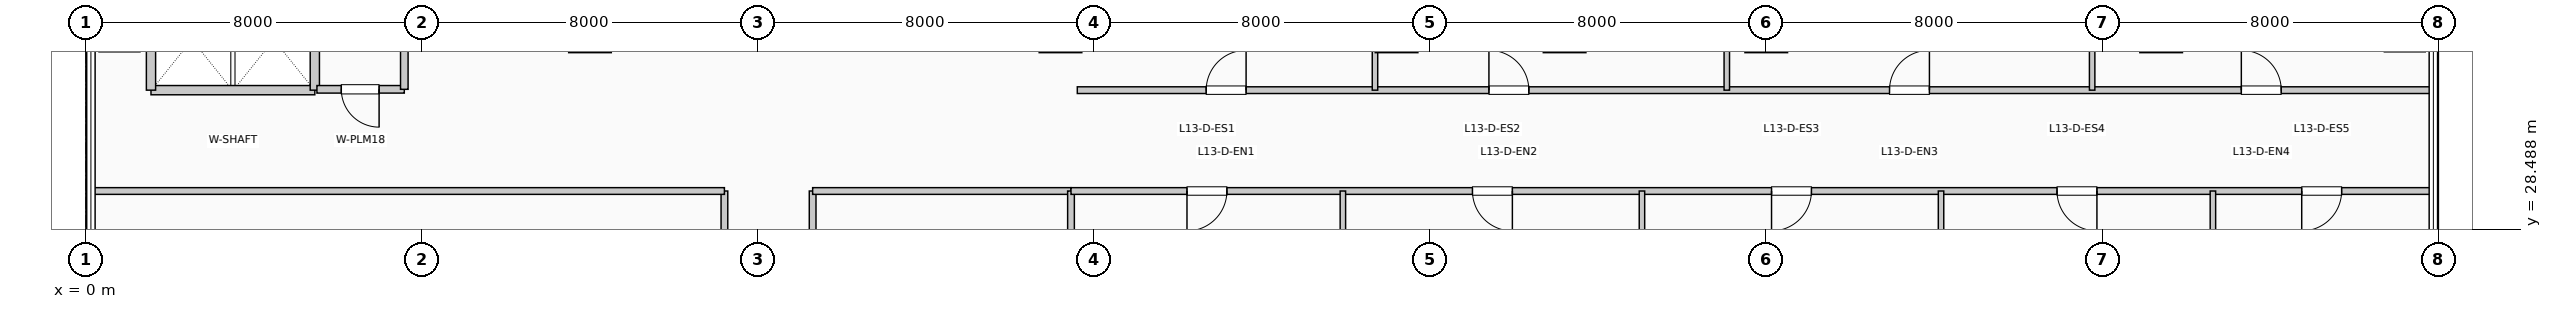
"""IFC4 building model, lengths in metres.
Left out: names, types, materials, properties, quantities, classifications, styles, units other than length and angle.
Written with IfcOpenShell. Run it as: python <this file> out.ifc"""

import sys

from ifc_helpers import new_model, si_unit, direction, frame, frame_2d, origin, place, context, subcontext, project, spatial, rectangle, extrude, element, fill, save


model = new_model("IFC4")
c1 = context("Model", 3, precision=1e-05, world=origin(), true_north=direction((0.0, 1.0)))
c2 = subcontext(c1, "Body", "Model", "MODEL_VIEW")
j1 = project(units=[si_unit("LENGTHUNIT", "METRE"), si_unit("PLANEANGLEUNIT", "RADIAN")], contexts=[c1])
p1 = place(None, origin())
s1 = spatial("IfcSite", under=j1, at=p1, CompositionType="ELEMENT")
p2 = place(p1, origin())
s2 = spatial("IfcBuilding", under=s1, at=p2, CompositionType="ELEMENT")
p3 = place(p2, frame((0.0, 0.0, 58.08)))
s3 = spatial("IfcBuildingStorey", under=s2, at=p3, CompositionType="ELEMENT", Elevation=58.08)
p4 = place(p3, frame((1.55, 31.8, 0.0), z_axis=(0.0, 0.0, 1.0), x_axis=(1.0, 0.0, 0.0)))
e1 = element("IfcWall", 1, at=p4, inside=s3, PredefinedType="PARTITIONING", context=c2, shape_type="SweptSolid", body=[
    extrude(rectangle(XDim=3.9, YDim=0.22, at=frame_2d((1.95, 0.0))), origin(), (0.0, 0.0, 1.0), 3.71),
])
for number, where, z_axis, x_axis in (
    (2, (1.55, 31.8, 0.0), (0.0, 0.0, 1.0), (0.0, 1.0, 0.0)),
    (3, (5.45, 31.8, 0.0), (0.0, 0.0, 1.0), (0.0, 1.0, 0.0)),
):
    element("IfcWall", number, at=place(p3, frame(where, z_axis=z_axis, x_axis=x_axis)), inside=s3, PredefinedType="PARTITIONING", context=c2, shape_type="SweptSolid", body=[
        extrude(rectangle(XDim=2.38, YDim=0.22, at=frame_2d((1.19, 0.0))), origin(), (0.0, 0.0, 1.0), 3.71),
    ])
p5 = place(p3, frame((5.5, 31.82, 0.0), z_axis=(0.0, 0.0, 1.0), x_axis=(1.0, 0.0, 0.0)))
e4 = element("IfcWall", 4, at=p5, inside=s3, PredefinedType="PLUMBINGWALL", context=c2, shape_type="SweptSolid", body=[
    extrude(rectangle(XDim=2.08, YDim=0.18, at=frame_2d((1.04, 0.0))), origin(), (0.0, 0.0, 1.0), 3.71),
])
p6 = place(p5, frame((1.48, 0.0, 0.0), z_axis=(0.0, 0.0, 1.0), x_axis=(-1.0, 0.0, 0.0)))
e5 = element("IfcOpeningElement", 5, at=p6, cuts=e4, PredefinedType="OPENING", context=c2, shape_type="SweptSolid", body=[
    extrude(rectangle(XDim=0.9, YDim=2.1, at=frame_2d((0.45, 1.05))), frame((0.0, 0.1, 0.0), z_axis=(0.0, -1.0, 0.0), x_axis=(1.0, 0.0, 0.0)), (0.0, 0.0, 1.0), 0.2),
])
p7 = place(p3, frame((7.58, 31.82, 0.0), z_axis=(0.0, 0.0, 1.0), x_axis=(0.0, 1.0, 0.0)))
e6 = element("IfcWall", 6, at=p7, inside=s3, PredefinedType="PLUMBINGWALL", context=c2, shape_type="SweptSolid", body=[
    extrude(rectangle(XDim=2.36, YDim=0.18, at=frame_2d((1.18, 0.0))), origin(), (0.0, 0.0, 1.0), 3.71),
])
p8 = place(p3, frame((15.2, 4.39, 0.0), z_axis=(0.0, 0.0, 1.0), x_axis=(0.0, 1.0, 0.0)))
e7 = element("IfcWall", 7, at=p8, inside=s3, PredefinedType="PARTITIONING", context=c2, shape_type="SweptSolid", body=[
    extrude(rectangle(XDim=25.01, YDim=0.16, at=frame_2d((12.505, 0.0))), origin(), (0.0, 0.0, 1.0), 3.71),
])
p9 = place(p8, frame((2.851, 0.0, 0.0), z_axis=(0.0, 0.0, 1.0), x_axis=(-1.0, 0.0, 0.0)))
e8 = element("IfcOpeningElement", 8, at=p9, cuts=e7, PredefinedType="OPENING", context=c2, shape_type="SweptSolid", body=[
    extrude(rectangle(XDim=0.95, YDim=2.15, at=frame_2d((0.475, 1.075))), frame((0.0, 0.09, 0.0), z_axis=(0.0, -1.0, 0.0), x_axis=(1.0, 0.0, 0.0)), (0.0, 0.0, 1.0), 0.18),
])
p10 = place(p8, frame((7.728, 0.0, 0.0), z_axis=(0.0, 0.0, 1.0), x_axis=(-1.0, 0.0, 0.0)))
e9 = element("IfcOpeningElement", 9, at=p10, cuts=e7, PredefinedType="OPENING", context=c2, shape_type="SweptSolid", body=[
    extrude(rectangle(XDim=0.95, YDim=2.15, at=frame_2d((0.475, 1.075))), frame((0.0, 0.09, 0.0), z_axis=(0.0, -1.0, 0.0), x_axis=(1.0, 0.0, 0.0)), (0.0, 0.0, 1.0), 0.18),
])
p11 = place(p8, frame((12.73, 0.0, 0.0), z_axis=(0.0, 0.0, 1.0), x_axis=(-1.0, 0.0, 0.0)))
e10 = element("IfcOpeningElement", 10, at=p11, cuts=e7, PredefinedType="OPENING", context=c2, shape_type="SweptSolid", body=[
    extrude(rectangle(XDim=0.95, YDim=2.15, at=frame_2d((0.475, 1.075))), frame((0.0, 0.09, 0.0), z_axis=(0.0, -1.0, 0.0), x_axis=(1.0, 0.0, 0.0)), (0.0, 0.0, 1.0), 0.18),
])
p12 = place(p8, frame((17.732, 0.0, 0.0), z_axis=(0.0, 0.0, 1.0), x_axis=(-1.0, 0.0, 0.0)))
e11 = element("IfcOpeningElement", 11, at=p12, cuts=e7, PredefinedType="OPENING", context=c2, shape_type="SweptSolid", body=[
    extrude(rectangle(XDim=0.95, YDim=2.15, at=frame_2d((0.475, 1.075))), frame((0.0, 0.09, 0.0), z_axis=(0.0, -1.0, 0.0), x_axis=(1.0, 0.0, 0.0)), (0.0, 0.0, 1.0), 0.18),
])
p13 = place(p8, frame((22.859, 0.0, 0.0), z_axis=(0.0, 0.0, 1.0), x_axis=(-1.0, 0.0, 0.0)))
e12 = element("IfcOpeningElement", 12, at=p13, cuts=e7, PredefinedType="OPENING", context=c2, shape_type="SweptSolid", body=[
    extrude(rectangle(XDim=0.95, YDim=2.15, at=frame_2d((0.475, 1.075))), frame((0.0, 0.09, 0.0), z_axis=(0.0, -1.0, 0.0), x_axis=(1.0, 0.0, 0.0)), (0.0, 0.0, 1.0), 0.18),
])
p14 = place(p3, frame((17.3, 4.39, 0.0), z_axis=(0.0, 0.0, 1.0), x_axis=(0.0, 1.0, 0.0)))
e13 = element("IfcWall", 13, at=p14, inside=s3, PredefinedType="PARTITIONING", context=c2, shape_type="SweptSolid", body=[
    extrude(rectangle(XDim=25.01, YDim=0.16, at=frame_2d((12.505, 0.0))), origin(), (0.0, 0.0, 1.0), 3.71),
])
p15 = place(p14, frame((5.778, 0.0, 0.0)))
e14 = element("IfcOpeningElement", 14, at=p15, cuts=e13, PredefinedType="OPENING", context=c2, shape_type="SweptSolid", body=[
    extrude(rectangle(XDim=0.95, YDim=2.15, at=frame_2d((0.475, 1.075))), frame((0.0, 0.09, 0.0), z_axis=(0.0, -1.0, 0.0), x_axis=(1.0, 0.0, 0.0)), (0.0, 0.0, 1.0), 0.18),
])
p16 = place(p14, frame((18.282, 0.0, 0.0)))
e15 = element("IfcOpeningElement", 15, at=p16, cuts=e13, PredefinedType="OPENING", context=c2, shape_type="SweptSolid", body=[
    extrude(rectangle(XDim=0.95, YDim=2.15, at=frame_2d((0.475, 1.075))), frame((0.0, 0.09, 0.0), z_axis=(0.0, -1.0, 0.0), x_axis=(1.0, 0.0, 0.0)), (0.0, 0.0, 1.0), 0.18),
])
p17 = place(p3, frame((0.19, 29.4, 0.0), z_axis=(0.0, 0.0, 1.0), x_axis=(1.0, 0.0, 0.0)))
e16 = element("IfcWall", 16, at=p17, inside=s3, PredefinedType="PARTITIONING", context=c2, shape_type="SweptSolid", body=[
    extrude(rectangle(XDim=15.01, YDim=0.16, at=frame_2d((7.505, 0.0))), origin(), (0.0, 0.0, 1.0), 3.365),
])
p18 = place(p3, frame((17.3, 29.4, 0.0), z_axis=(0.0, 0.0, 1.0), x_axis=(1.0, 0.0, 0.0)))
e17 = element("IfcWall", 17, at=p18, inside=s3, PredefinedType="PARTITIONING", context=c2, shape_type="SweptSolid", body=[
    extrude(rectangle(XDim=6.15, YDim=0.16, at=frame_2d((3.075, 0.0))), origin(), (0.0, 0.0, 1.0), 3.71),
])
p19 = place(p3, frame((23.45, 0.19, 0.0), z_axis=(0.0, 0.0, 1.0), x_axis=(0.0, 1.0, 0.0)))
e18 = element("IfcWall", 18, at=p19, inside=s3, PredefinedType="PARTITIONING", context=c2, shape_type="SweptSolid", body=[
    extrude(rectangle(XDim=29.21, YDim=0.16, at=frame_2d((14.605, 0.0))), origin(), (0.0, 0.0, 1.0), 2.995),
])
p20 = place(p3, frame((23.45, 29.4, 0.0), z_axis=(0.0, 0.0, 1.0), x_axis=(1.0, 0.0, 0.0)))
e19 = element("IfcWall", 19, at=p20, inside=s3, PredefinedType="PARTITIONING", context=c2, shape_type="SweptSolid", body=[
    extrude(rectangle(XDim=32.36, YDim=0.16, at=frame_2d((16.18, 0.0))), origin(), (0.0, 0.0, 1.0), 3.365),
])
p21 = place(p20, frame((3.711, 0.0, 0.0), z_axis=(0.0, 0.0, 1.0), x_axis=(-1.0, 0.0, 0.0)))
e20 = element("IfcOpeningElement", 20, at=p21, cuts=e19, PredefinedType="OPENING", context=c2, shape_type="SweptSolid", body=[
    extrude(rectangle(XDim=0.95, YDim=2.15, at=frame_2d((0.475, 1.075))), frame((0.0, 0.09, 0.0), z_axis=(0.0, -1.0, 0.0), x_axis=(1.0, 0.0, 0.0)), (0.0, 0.0, 1.0), 0.18),
])
p22 = place(p20, frame((10.507, 0.0, 0.0), z_axis=(0.0, 0.0, 1.0), x_axis=(-1.0, 0.0, 0.0)))
e21 = element("IfcOpeningElement", 21, at=p22, cuts=e19, PredefinedType="OPENING", context=c2, shape_type="SweptSolid", body=[
    extrude(rectangle(XDim=0.95, YDim=2.15, at=frame_2d((0.475, 1.075))), frame((0.0, 0.09, 0.0), z_axis=(0.0, -1.0, 0.0), x_axis=(1.0, 0.0, 0.0)), (0.0, 0.0, 1.0), 0.18),
])
p23 = place(p20, frame((17.626, 0.0, 0.0), z_axis=(0.0, 0.0, 1.0), x_axis=(-1.0, 0.0, 0.0)))
e22 = element("IfcOpeningElement", 22, at=p23, cuts=e19, PredefinedType="OPENING", context=c2, shape_type="SweptSolid", body=[
    extrude(rectangle(XDim=0.95, YDim=2.15, at=frame_2d((0.475, 1.075))), frame((0.0, 0.09, 0.0), z_axis=(0.0, -1.0, 0.0), x_axis=(1.0, 0.0, 0.0)), (0.0, 0.0, 1.0), 0.18),
])
p24 = place(p20, frame((24.421, 0.0, 0.0), z_axis=(0.0, 0.0, 1.0), x_axis=(-1.0, 0.0, 0.0)))
e23 = element("IfcOpeningElement", 23, at=p24, cuts=e19, PredefinedType="OPENING", context=c2, shape_type="SweptSolid", body=[
    extrude(rectangle(XDim=0.95, YDim=2.15, at=frame_2d((0.475, 1.075))), frame((0.0, 0.09, 0.0), z_axis=(0.0, -1.0, 0.0), x_axis=(1.0, 0.0, 0.0)), (0.0, 0.0, 1.0), 0.18),
])
p25 = place(p20, frame((30.246, 0.0, 0.0), z_axis=(0.0, 0.0, 1.0), x_axis=(-1.0, 0.0, 0.0)))
e24 = element("IfcOpeningElement", 24, at=p25, cuts=e19, PredefinedType="OPENING", context=c2, shape_type="SweptSolid", body=[
    extrude(rectangle(XDim=0.95, YDim=2.15, at=frame_2d((0.475, 1.075))), frame((0.0, 0.09, 0.0), z_axis=(0.0, -1.0, 0.0), x_axis=(1.0, 0.0, 0.0)), (0.0, 0.0, 1.0), 0.18),
])
p26 = place(p3, frame((23.6, 31.8, 0.0), z_axis=(0.0, 0.0, 1.0), x_axis=(1.0, 0.0, 0.0)))
e25 = element("IfcWall", 25, at=p26, inside=s3, PredefinedType="PARTITIONING", context=c2, shape_type="SweptSolid", body=[
    extrude(rectangle(XDim=32.21, YDim=0.16, at=frame_2d((16.105, 0.0))), origin(), (0.0, 0.0, 1.0), 3.71),
])
p27 = place(p26, frame((3.068, 0.0, 0.0)))
e26 = element("IfcOpeningElement", 26, at=p27, cuts=e25, PredefinedType="OPENING", context=c2, shape_type="SweptSolid", body=[
    extrude(rectangle(XDim=0.95, YDim=2.15, at=frame_2d((0.475, 1.075))), frame((0.0, 0.09, 0.0), z_axis=(0.0, -1.0, 0.0), x_axis=(1.0, 0.0, 0.0)), (0.0, 0.0, 1.0), 0.18),
])
p28 = place(p26, frame((9.799, 0.0, 0.0)))
e27 = element("IfcOpeningElement", 27, at=p28, cuts=e25, PredefinedType="OPENING", context=c2, shape_type="SweptSolid", body=[
    extrude(rectangle(XDim=0.95, YDim=2.15, at=frame_2d((0.475, 1.075))), frame((0.0, 0.09, 0.0), z_axis=(0.0, -1.0, 0.0), x_axis=(1.0, 0.0, 0.0)), (0.0, 0.0, 1.0), 0.18),
])
p29 = place(p26, frame((19.334, 0.0, 0.0)))
e28 = element("IfcOpeningElement", 28, at=p29, cuts=e25, PredefinedType="OPENING", context=c2, shape_type="SweptSolid", body=[
    extrude(rectangle(XDim=0.95, YDim=2.15, at=frame_2d((0.475, 1.075))), frame((0.0, 0.09, 0.0), z_axis=(0.0, -1.0, 0.0), x_axis=(1.0, 0.0, 0.0)), (0.0, 0.0, 1.0), 0.18),
])
p30 = place(p26, frame((27.709, 0.0, 0.0)))
e29 = element("IfcOpeningElement", 29, at=p30, cuts=e25, PredefinedType="OPENING", context=c2, shape_type="SweptSolid", body=[
    extrude(rectangle(XDim=0.95, YDim=2.15, at=frame_2d((0.475, 1.075))), frame((0.0, 0.09, 0.0), z_axis=(0.0, -1.0, 0.0), x_axis=(1.0, 0.0, 0.0)), (0.0, 0.0, 1.0), 0.18),
])
for number, where, z_axis, x_axis in (
    (30, (29.922, 18.19, 0.0), (0.0, 0.0, 1.0), (0.0, 1.0, 0.0)),
    (31, (37.041, 18.19, 0.0), (0.0, 0.0, 1.0), (0.0, 1.0, 0.0)),
    (32, (44.16, 18.19, 0.0), (0.0, 0.0, 1.0), (0.0, 1.0, 0.0)),
    (33, (50.632, 18.19, 0.0), (0.0, 0.0, 1.0), (0.0, 1.0, 0.0)),
):
    element("IfcWall", number, at=place(p3, frame(where, z_axis=z_axis, x_axis=x_axis)), inside=s3, PredefinedType="PARTITIONING", context=c2, shape_type="SweptSolid", body=[
        extrude(rectangle(XDim=11.21, YDim=0.13, at=frame_2d((5.605, 0.0))), origin(), (0.0, 0.0, 1.0), 3.71),
    ])
for number, where, z_axis, x_axis in (
    (34, (30.686, 31.8, 0.0), (0.0, 0.0, 1.0), (0.0, 1.0, 0.0)),
    (35, (39.061, 31.8, 0.0), (0.0, 0.0, 1.0), (0.0, 1.0, 0.0)),
    (36, (47.758, 31.8, 0.0), (0.0, 0.0, 1.0), (0.0, 1.0, 0.0)),
):
    element("IfcWall", number, at=place(p3, frame(where, z_axis=z_axis, x_axis=x_axis)), inside=s3, PredefinedType="PARTITIONING", context=c2, shape_type="SweptSolid", body=[
        extrude(rectangle(XDim=14.01, YDim=0.13, at=frame_2d((7.005, 0.0))), origin(), (0.0, 0.0, 1.0), 3.71),
    ])
p31 = place(p6, origin())
e37 = element("IfcDoor", 37, at=p31, inside=s3, OperationType="SINGLE_SWING_RIGHT", PredefinedType="DOOR", context=c2, shape_type="SweptSolid", body=[
    extrude(rectangle(XDim=0.9, YDim=2.1, at=frame_2d((0.45, 1.05))), frame((0.0, 0.025, 0.0), z_axis=(0.0, -1.0, 0.0), x_axis=(1.0, 0.0, 0.0)), (0.0, 0.0, 1.0), 0.05),
])
fill(e5, e37)
p32 = place(p21, origin())
e38 = element("IfcDoor", 38, at=p32, inside=s3, OperationType="SINGLE_SWING_LEFT", PredefinedType="DOOR", context=c2, shape_type="SweptSolid", body=[
    extrude(rectangle(XDim=0.95, YDim=2.15, at=frame_2d((0.475, 1.075))), frame((0.0, 0.025, 0.0), z_axis=(0.0, -1.0, 0.0), x_axis=(1.0, 0.0, 0.0)), (0.0, 0.0, 1.0), 0.05),
])
fill(e20, e38)
p33 = place(p22, origin())
e39 = element("IfcDoor", 39, at=p33, inside=s3, OperationType="SINGLE_SWING_RIGHT", PredefinedType="DOOR", context=c2, shape_type="SweptSolid", body=[
    extrude(rectangle(XDim=0.95, YDim=2.15, at=frame_2d((0.475, 1.075))), frame((0.0, 0.025, 0.0), z_axis=(0.0, -1.0, 0.0), x_axis=(1.0, 0.0, 0.0)), (0.0, 0.0, 1.0), 0.05),
])
fill(e21, e39)
p34 = place(p23, origin())
e40 = element("IfcDoor", 40, at=p34, inside=s3, OperationType="SINGLE_SWING_LEFT", PredefinedType="DOOR", context=c2, shape_type="SweptSolid", body=[
    extrude(rectangle(XDim=0.95, YDim=2.15, at=frame_2d((0.475, 1.075))), frame((0.0, 0.025, 0.0), z_axis=(0.0, -1.0, 0.0), x_axis=(1.0, 0.0, 0.0)), (0.0, 0.0, 1.0), 0.05),
])
fill(e22, e40)
p35 = place(p24, origin())
e41 = element("IfcDoor", 41, at=p35, inside=s3, OperationType="SINGLE_SWING_RIGHT", PredefinedType="DOOR", context=c2, shape_type="SweptSolid", body=[
    extrude(rectangle(XDim=0.95, YDim=2.15, at=frame_2d((0.475, 1.075))), frame((0.0, 0.025, 0.0), z_axis=(0.0, -1.0, 0.0), x_axis=(1.0, 0.0, 0.0)), (0.0, 0.0, 1.0), 0.05),
])
fill(e23, e41)
p36 = place(p25, origin())
e42 = element("IfcDoor", 42, at=p36, inside=s3, OperationType="SINGLE_SWING_LEFT", PredefinedType="DOOR", context=c2, shape_type="SweptSolid", body=[
    extrude(rectangle(XDim=0.95, YDim=2.15, at=frame_2d((0.475, 1.075))), frame((0.0, 0.025, 0.0), z_axis=(0.0, -1.0, 0.0), x_axis=(1.0, 0.0, 0.0)), (0.0, 0.0, 1.0), 0.05),
])
fill(e24, e42)
p37 = place(p27, origin())
e43 = element("IfcDoor", 43, at=p37, inside=s3, OperationType="SINGLE_SWING_RIGHT", PredefinedType="DOOR", context=c2, shape_type="SweptSolid", body=[
    extrude(rectangle(XDim=0.95, YDim=2.15, at=frame_2d((0.475, 1.075))), frame((0.0, 0.025, 0.0), z_axis=(0.0, -1.0, 0.0), x_axis=(1.0, 0.0, 0.0)), (0.0, 0.0, 1.0), 0.05),
])
fill(e26, e43)
p38 = place(p28, origin())
e44 = element("IfcDoor", 44, at=p38, inside=s3, OperationType="SINGLE_SWING_LEFT", PredefinedType="DOOR", context=c2, shape_type="SweptSolid", body=[
    extrude(rectangle(XDim=0.95, YDim=2.15, at=frame_2d((0.475, 1.075))), frame((0.0, 0.025, 0.0), z_axis=(0.0, -1.0, 0.0), x_axis=(1.0, 0.0, 0.0)), (0.0, 0.0, 1.0), 0.05),
])
fill(e27, e44)
p39 = place(p29, origin())
e45 = element("IfcDoor", 45, at=p39, inside=s3, OperationType="SINGLE_SWING_RIGHT", PredefinedType="DOOR", context=c2, shape_type="SweptSolid", body=[
    extrude(rectangle(XDim=0.95, YDim=2.15, at=frame_2d((0.475, 1.075))), frame((0.0, 0.025, 0.0), z_axis=(0.0, -1.0, 0.0), x_axis=(1.0, 0.0, 0.0)), (0.0, 0.0, 1.0), 0.05),
])
fill(e28, e45)
p40 = place(p30, origin())
e46 = element("IfcDoor", 46, at=p40, inside=s3, OperationType="SINGLE_SWING_LEFT", PredefinedType="DOOR", context=c2, shape_type="SweptSolid", body=[
    extrude(rectangle(XDim=0.95, YDim=2.15, at=frame_2d((0.475, 1.075))), frame((0.0, 0.025, 0.0), z_axis=(0.0, -1.0, 0.0), x_axis=(1.0, 0.0, 0.0)), (0.0, 0.0, 1.0), 0.05),
])
fill(e29, e46)
save(model, sys.argv[1])
